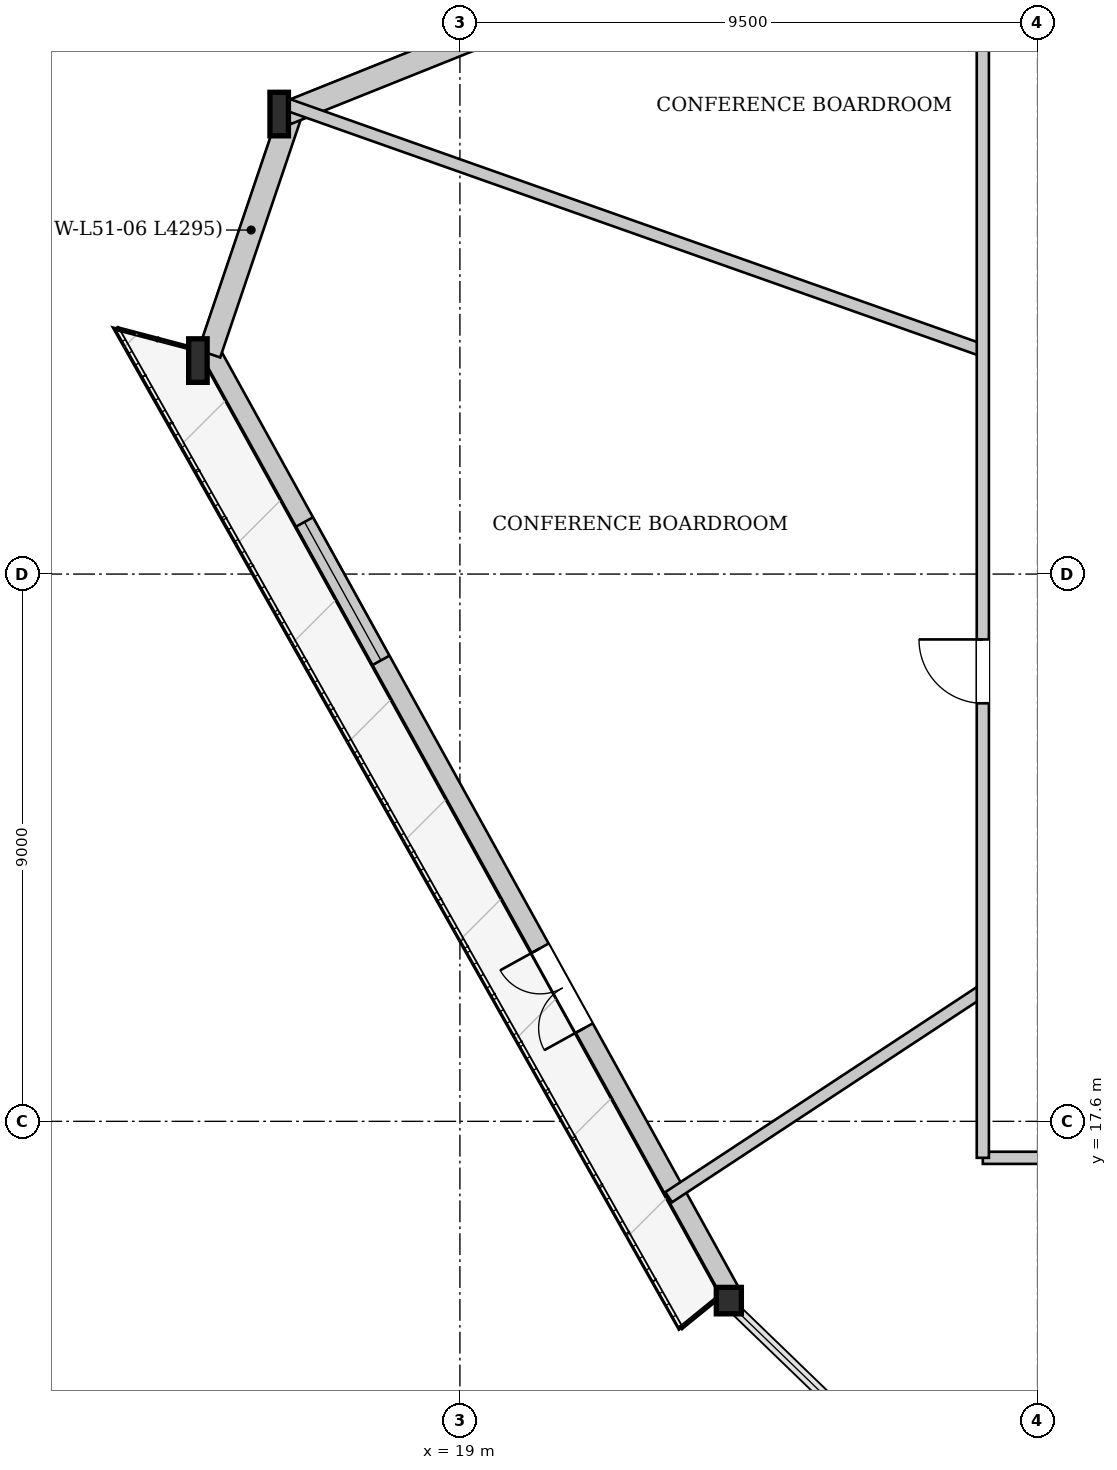
"""IFC4 building model, lengths in metres.
Left out: names, types, materials, properties, quantities, classifications, styles, units other than length and angle.
Written with IfcOpenShell. Run it as: python <this file> out.ifc"""

import sys

from ifc_helpers import new_model, si_unit, direction, frame, frame_2d, origin, origin_2d, place, context, subcontext, project, spatial, rectangle, i_section, extrude, source, transform, mapped, element, fill, save


model = new_model("IFC4")
c1 = context("Model", 3, precision=1e-05, world=origin(), true_north=direction((0.0, 1.0)))
c2 = subcontext(c1, "Body", "Model", "MODEL_VIEW")
j1 = project(units=[si_unit("LENGTHUNIT", "METRE"), si_unit("PLANEANGLEUNIT", "RADIAN")], contexts=[c1])
p1 = place(None, origin())
s1 = spatial("IfcSite", under=j1, at=p1, CompositionType="ELEMENT")
p2 = place(p1, origin())
s2 = spatial("IfcBuilding", under=s1, at=p2, CompositionType="ELEMENT")
p3 = place(p2, frame((0.0, 0.0, 192.75)))
s3 = spatial("IfcBuildingStorey", under=s2, at=p3, CompositionType="ELEMENT", Elevation=192.75)
m1 = source(origin(), c2, "Body", "SweptSolid", [
    extrude(i_section(OverallWidth=0.304, OverallDepth=0.716, WebThickness=0.021, FlangeThickness=0.04, at=origin_2d()), origin(), (0.0, 0.0, 1.0), 3.407),
])
p4 = place(p3, frame((16.075, 34.353, 0.0), z_axis=(-0.027945986279, -0.110207504864, 0.993515640402), x_axis=(0.969321399482, -0.245796713783, 0.0)))
e1 = element("IfcColumn", 1, at=p4, inside=s3, PredefinedType="COLUMN", context=c2, shape_type="MappedRepresentation", body=[
    mapped(m1, transform((0.0, 0.0, 0.0), x_axis=(1.0, 0.0, 0.0), y_axis=(0.0, 1.0, 0.0), z_axis=(0.0, 0.0, 1.0), scale=1.0)),
])
m2 = source(origin(), c2, "Body", "SweptSolid", [
    extrude(i_section(OverallWidth=0.304, OverallDepth=0.716, WebThickness=0.021, FlangeThickness=0.04, at=origin_2d()), origin(), (0.0, 0.0, 1.0), 3.403),
])
p5 = place(p3, frame((14.698, 30.284, 0.0), z_axis=(-0.004376695541, -0.101740234057, 0.994801371787), x_axis=(0.999075993659, -0.042978586469, 0.0)))
e2 = element("IfcColumn", 2, at=p5, inside=s3, PredefinedType="COLUMN", context=c2, shape_type="MappedRepresentation", body=[
    mapped(m2, transform((0.0, 0.0, 0.0), x_axis=(1.0, 0.0, 0.0), y_axis=(0.0, 1.0, 0.0), z_axis=(0.0, 0.0, 1.0), scale=1.0)),
])
m3 = source(origin(), c2, "Body", "SweptSolid", [
    extrude(i_section(OverallWidth=0.412, OverallDepth=0.435, WebThickness=0.031, FlangeThickness=0.05, at=origin_2d()), origin(), (0.0, 0.0, 1.0), 3.399),
])
p6 = place(p3, frame((23.292, 14.737, 0.0), z_axis=(0.076918881713, -0.050058319845, 0.99577992059), x_axis=(0.545455886295, 0.8381395326, 0.0)))
e3 = element("IfcColumn", 3, at=p6, inside=s3, PredefinedType="COLUMN", context=c2, shape_type="MappedRepresentation", body=[
    mapped(m3, transform((0.0, 0.0, 0.0), x_axis=(1.0, 0.0, 0.0), y_axis=(0.0, 1.0, 0.0), z_axis=(0.0, 0.0, 1.0), scale=1.0)),
])
p7 = place(p3, frame((23.432, 14.814, 0.0), z_axis=(0.0, 0.0, 1.0), x_axis=(-0.483768949269, 0.87519575166, 0.0)))
e4 = element("IfcWall", 4, at=p7, inside=s3, PredefinedType="SOLIDWALL", context=c2, shape_type="SweptSolid", body=[
    extrude(rectangle(XDim=17.764, YDim=0.32, at=frame_2d((8.882, 0.0))), origin(), (0.0, 0.0, 1.0), 2.722),
])
p8 = place(p7, frame((4.935, 0.0, 0.0)))
e5 = element("IfcOpeningElement", 5, at=p8, cuts=e4, PredefinedType="OPENING", context=c2, shape_type="SweptSolid", body=[
    extrude(rectangle(XDim=1.5, YDim=2.3, at=frame_2d((0.75, 1.15))), frame((0.0, 0.17, 0.0), z_axis=(0.0, -1.0, 0.0), x_axis=(1.0, 0.0, 0.0)), (0.0, 0.0, 1.0), 0.34),
])
p9 = place(p7, frame((11.845, 0.0, 0.252)))
e6 = element("IfcOpeningElement", 6, at=p9, cuts=e4, PredefinedType="OPENING", context=c2, shape_type="SweptSolid", body=[
    extrude(rectangle(XDim=2.6, YDim=2.35, at=frame_2d((1.3, 1.175))), frame((0.0, 0.17, 0.0), z_axis=(0.0, -1.0, 0.0), x_axis=(1.0, 0.0, 0.0)), (0.0, 0.0, 1.0), 0.34),
])
p10 = place(p3, frame((14.878, 30.223, 0.0), z_axis=(0.0, 0.0, 1.0), x_axis=(0.320555378546, 0.947229776393, 0.0)))
e7 = element("IfcWall", 7, at=p10, inside=s3, PredefinedType="SOLIDWALL", context=c2, shape_type="SweptSolid", body=[
    extrude(rectangle(XDim=4.295, YDim=0.38, at=frame_2d((2.148, 0.0))), origin(), (0.0, 0.0, 1.0), 2.722),
])
p11 = place(p3, frame((16.146, 34.177, 0.0), z_axis=(0.0, 0.0, 1.0), x_axis=(0.928328726299, 0.371760374339, 0.0)))
e8 = element("IfcWall", 8, at=p11, inside=s3, PredefinedType="SOLIDWALL", context=c2, shape_type="SweptSolid", body=[
    extrude(rectangle(XDim=22.656, YDim=0.38, at=frame_2d((11.328, 0.0))), origin(), (0.0, 0.0, 1.0), 2.722),
])
p12 = place(p11, frame((5.244, 0.0, 0.352)))
e9 = element("IfcOpeningElement", 9, at=p12, cuts=e8, PredefinedType="OPENING", context=c2, shape_type="SweptSolid", body=[
    extrude(rectangle(XDim=2.2, YDim=2.25, at=frame_2d((1.1, 1.125))), frame((0.0, 0.2, 0.0), z_axis=(0.0, -1.0, 0.0), x_axis=(1.0, 0.0, 0.0)), (0.0, 0.0, 1.0), 0.4),
])
p13 = place(p11, frame((15.212, 0.0, 0.352)))
e10 = element("IfcOpeningElement", 10, at=p13, cuts=e8, PredefinedType="OPENING", context=c2, shape_type="SweptSolid", body=[
    extrude(rectangle(XDim=2.2, YDim=2.25, at=frame_2d((1.1, 1.125))), frame((0.0, 0.2, 0.0), z_axis=(0.0, -1.0, 0.0), x_axis=(1.0, 0.0, 0.0)), (0.0, 0.0, 1.0), 0.4),
])
p14 = place(p3, frame((27.6, 30.277, 0.0), z_axis=(0.0, 0.0, 1.0), x_axis=(-0.942818521108, 0.333306519972, 0.0)))
e11 = element("IfcWall", 11, at=p14, inside=s3, PredefinedType="PARTITIONING", context=c2, shape_type="SweptSolid", body=[
    extrude(rectangle(XDim=12.181, YDim=0.2, at=frame_2d((6.091, 0.0))), origin(), (0.0, 0.0, 1.0), 2.925),
])
p15 = place(p3, frame((27.6, 19.754, 0.0), z_axis=(0.0, 0.0, 1.0), x_axis=(-0.835254425116, -0.549863660668, 0.0)))
e12 = element("IfcWall", 12, at=p15, inside=s3, PredefinedType="PARTITIONING", context=c2, shape_type="SweptSolid", body=[
    extrude(rectangle(XDim=6.186, YDim=0.2, at=frame_2d((3.093, 0.0))), origin(), (0.0, 0.0, 1.0), 3.33),
])
p16 = place(p3, frame((27.6, 17.0, 0.0), z_axis=(0.0, 0.0, 1.0), x_axis=(1.0, 0.0, 0.0)))
e13 = element("IfcWall", 13, at=p16, inside=s3, PredefinedType="PARTITIONING", context=c2, shape_type="SweptSolid", body=[
    extrude(rectangle(XDim=20.8, YDim=0.2, at=frame_2d((10.4, 0.0))), origin(), (0.0, 0.0, 1.0), 3.33),
])
p17 = place(p16, frame((19.45, 0.0, 0.0)))
e14 = element("IfcOpeningElement", 14, at=p17, cuts=e13, PredefinedType="OPENING", context=c2, shape_type="SweptSolid", body=[
    extrude(rectangle(XDim=1.05, YDim=2.2, at=frame_2d((0.525, 1.1))), frame((0.0, 0.11, 0.0), z_axis=(0.0, -1.0, 0.0), x_axis=(1.0, 0.0, 0.0)), (0.0, 0.0, 1.0), 0.22),
])
p18 = place(p16, frame((5.239, 0.0, 0.0)))
e15 = element("IfcOpeningElement", 15, at=p18, cuts=e13, PredefinedType="OPENING", context=c2, shape_type="SweptSolid", body=[
    extrude(rectangle(XDim=1.05, YDim=2.2, at=frame_2d((0.525, 1.1))), frame((0.0, 0.11, 0.0), z_axis=(0.0, -1.0, 0.0), x_axis=(1.0, 0.0, 0.0)), (0.0, 0.0, 1.0), 0.22),
])
p19 = place(p16, frame((12.653, 0.0, 0.0)))
e16 = element("IfcOpeningElement", 16, at=p19, cuts=e13, PredefinedType="OPENING", context=c2, shape_type="SweptSolid", body=[
    extrude(rectangle(XDim=1.05, YDim=2.2, at=frame_2d((0.525, 1.1))), frame((0.0, 0.11, 0.0), z_axis=(0.0, -1.0, 0.0), x_axis=(1.0, 0.0, 0.0)), (0.0, 0.0, 1.0), 0.22),
])
p20 = place(p3, frame((27.6, 17.0, 0.0), z_axis=(0.0, 0.0, 1.0), x_axis=(0.0, 1.0, 0.0)))
e17 = element("IfcWall", 17, at=p20, inside=s3, PredefinedType="PARTITIONING", context=c2, shape_type="SweptSolid", body=[
    extrude(rectangle(XDim=19.2, YDim=0.2, at=frame_2d((9.6, 0.0))), origin(), (0.0, 0.0, 1.0), 3.33),
])
p21 = place(p20, frame((7.475, 0.0, 0.0)))
e18 = element("IfcOpeningElement", 18, at=p21, cuts=e17, PredefinedType="OPENING", context=c2, shape_type="SweptSolid", body=[
    extrude(rectangle(XDim=1.05, YDim=2.2, at=frame_2d((0.525, 1.1))), frame((0.0, 0.11, 0.0), z_axis=(0.0, -1.0, 0.0), x_axis=(1.0, 0.0, 0.0)), (0.0, 0.0, 1.0), 0.22),
])
m4 = source(origin(), c2, "Body", "SweptSolid", [
    extrude(rectangle(XDim=1.5, YDim=2.3, at=frame_2d((0.75, 1.15))), frame((0.0, 0.025, 0.0), z_axis=(0.0, -1.0, 0.0), x_axis=(1.0, 0.0, 0.0)), (0.0, 0.0, 1.0), 0.05),
])
p22 = place(p8, origin())
e19 = element("IfcDoor", 19, at=p22, inside=s3, OperationType="DOUBLE_DOOR_SINGLE_SWING", PredefinedType="DOOR", context=c2, shape_type="MappedRepresentation", body=[
    mapped(m4, transform((0.0, 0.0, 0.0), x_axis=(1.0, 0.0, 0.0), y_axis=(0.0, 1.0, 0.0), z_axis=(0.0, 0.0, 1.0), scale=1.0)),
])
fill(e5, e19)
m5 = source(origin(), c2, "Body", "SweptSolid", [
    extrude(rectangle(XDim=2.6, YDim=2.35, at=frame_2d((1.3, 1.175))), frame((0.0, 0.03, 0.0), z_axis=(0.0, -1.0, 0.0), x_axis=(1.0, 0.0, 0.0)), (0.0, 0.0, 1.0), 0.06),
])
p23 = place(p9, origin())
e20 = element("IfcWindow", 20, at=p23, inside=s3, PartitioningType="SINGLE_PANEL", PredefinedType="WINDOW", context=c2, shape_type="MappedRepresentation", body=[
    mapped(m5, transform((0.0, 0.0, 0.0), x_axis=(1.0, 0.0, 0.0), y_axis=(0.0, 1.0, 0.0), z_axis=(0.0, 0.0, 1.0), scale=1.0)),
])
fill(e6, e20)
m6 = source(origin(), c2, "Body", "SweptSolid", [
    extrude(rectangle(XDim=1.05, YDim=2.2, at=frame_2d((0.525, 1.1))), frame((0.0, 0.025, 0.0), z_axis=(0.0, -1.0, 0.0), x_axis=(1.0, 0.0, 0.0)), (0.0, 0.0, 1.0), 0.05),
])
p24 = place(p21, origin())
e21 = element("IfcDoor", 21, at=p24, inside=s3, OperationType="SINGLE_SWING_RIGHT", PredefinedType="DOOR", context=c2, shape_type="MappedRepresentation", body=[
    mapped(m6, transform((0.0, 0.0, 0.0), x_axis=(1.0, 0.0, 0.0), y_axis=(0.0, 1.0, 0.0), z_axis=(0.0, 0.0, 1.0), scale=1.0)),
])
fill(e18, e21)
save(model, sys.argv[1])
